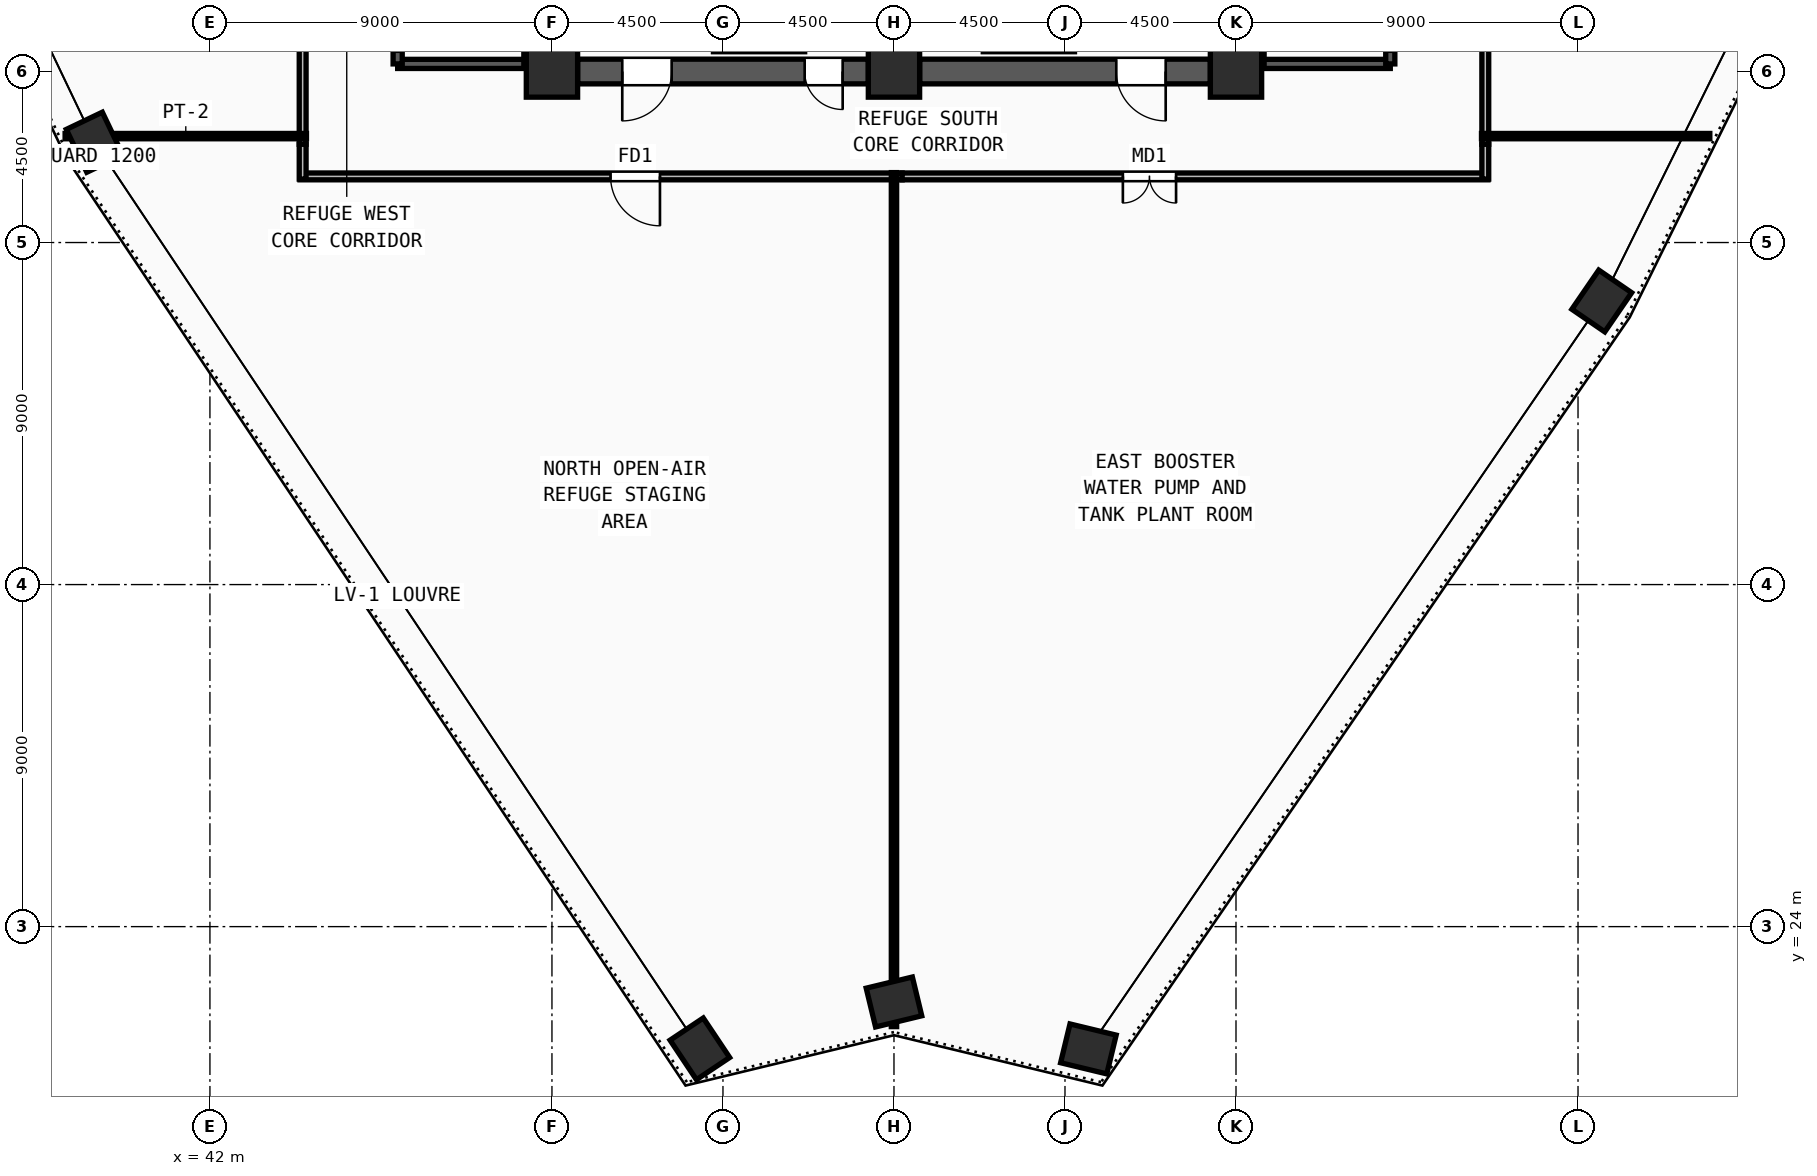
"""IFC4 building model, lengths in metres.
Left out: names, types, materials, properties, quantities, classifications, styles, units other than length and angle.
Written with IfcOpenShell. Run it as: python <this file> out.ifc"""

import sys

from ifc_helpers import new_model, si_unit, direction, frame, frame_2d, origin, origin_2d, place, context, subcontext, project, spatial, rectangle, extrude, source, transform, mapped, element, fill, save


model = new_model("IFC4")
c1 = context("Model", 3, precision=1e-05, world=origin(), true_north=direction((0.0, 1.0)))
c2 = subcontext(c1, "Body", "Model", "MODEL_VIEW")
j1 = project(units=[si_unit("LENGTHUNIT", "METRE"), si_unit("PLANEANGLEUNIT", "RADIAN")], contexts=[c1])
p1 = place(None, origin())
s1 = spatial("IfcSite", under=j1, at=p1, CompositionType="ELEMENT")
p2 = place(p1, origin())
s2 = spatial("IfcBuilding", under=s1, at=p2, CompositionType="ELEMENT")
p3 = place(p2, frame((0.0, 0.0, 277.5)))
s3 = spatial("IfcBuildingStorey", under=s2, at=p3, CompositionType="ELEMENT", Elevation=277.5)
m1 = source(origin(), c2, "Body", "SweptSolid", [
    extrude(rectangle(XDim=1.35, YDim=1.35, at=origin_2d()), origin(), (0.0, 0.0, 1.0), 4.5),
])
for number, where, z_axis, x_axis in (
    (1, (51.0, 46.5, 0.0), (0.0, 0.0, 1.0), (1.0, 0.0, 0.0)),
    (2, (60.0, 46.5, 0.0), (0.0, 0.0, 1.0), (1.0, 0.0, 0.0)),
    (3, (69.0, 46.5, 0.0), (0.0, 0.0, 1.0), (1.0, 0.0, 0.0)),
):
    element("IfcColumn", number, at=place(p3, frame(where, z_axis=z_axis, x_axis=x_axis)), inside=s3, PredefinedType="COLUMN", context=c2, shape_type="MappedRepresentation", body=[
        mapped(m1, transform((0.0, 0.0, 0.0), x_axis=(1.0, 0.0, 0.0), y_axis=(0.0, 1.0, 0.0), z_axis=(0.0, 0.0, 1.0), scale=1.0)),
    ])
m2 = source(origin(), c2, "Body", "SweptSolid", [
    extrude(rectangle(XDim=1.25, YDim=1.05, at=origin_2d()), origin(), (0.0, 0.0, 1.0), 4.5),
])
for number, where, z_axis, x_axis in (
    (4, (54.892, 20.784, 0.0), (0.0, 0.0, 1.0), (-0.555, 0.832, 0.0)),
    (5, (38.964, 44.639, 0.0), (0.0, 0.0, 1.0), (-0.431, 0.902, 0.0)),
    (6, (78.625, 40.462, 0.0), (0.0, 0.0, 1.0), (0.566, 0.824, 0.0)),
    (7, (65.116, 20.782, 0.0), (0.0, 0.0, 1.0), (-0.972, 0.235, 0.0)),
    (8, (60.0, 22.017, 0.0), (0.0, 0.0, 1.0), (0.972, 0.235, 0.0)),
):
    element("IfcColumn", number, at=place(p3, frame(where, z_axis=z_axis, x_axis=x_axis)), inside=s3, PredefinedType="COLUMN", context=c2, shape_type="MappedRepresentation", body=[
        mapped(m2, transform((0.0, 0.0, 0.0), x_axis=(1.0, 0.0, 0.0), y_axis=(0.0, 1.0, 0.0), z_axis=(0.0, 0.0, 1.0), scale=1.0)),
    ])
p4 = place(p3, frame((68.325, 46.5, 0.0), z_axis=(0.0, 0.0, 1.0), x_axis=(-1.0, 0.0, 0.0)))
e9 = element("IfcWall", 9, at=p4, inside=s3, PredefinedType="SHEAR", context=c2, shape_type="SweptSolid", body=[
    extrude(rectangle(XDim=7.65, YDim=0.65, at=frame_2d((3.825, 0.0))), origin(), (0.0, 0.0, 1.0), 4.22),
])
m3 = source(origin(), c2, "Body", "SweptSolid", [
    extrude(rectangle(XDim=1.3, YDim=2.2, at=frame_2d((0.65, 1.1))), frame((0.0, 0.335, 0.0), z_axis=(0.0, -1.0, 0.0), x_axis=(1.0, 0.0, 0.0)), (0.0, 0.0, 1.0), 0.67),
])
p5 = place(p4, frame((1.175, 0.0, 0.0)))
e10 = element("IfcOpeningElement", 10, at=p5, cuts=e9, PredefinedType="OPENING", context=c2, shape_type="MappedRepresentation", body=[
    mapped(m3, transform((0.0, 0.0, 0.0), x_axis=(1.0, 0.0, 0.0), y_axis=(0.0, 1.0, 0.0), z_axis=(0.0, 0.0, 1.0), scale=1.0)),
])
p6 = place(p3, frame((59.325, 46.5, 0.0), z_axis=(0.0, 0.0, 1.0), x_axis=(-1.0, 0.0, 0.0)))
e11 = element("IfcWall", 11, at=p6, inside=s3, PredefinedType="SHEAR", context=c2, shape_type="SweptSolid", body=[
    extrude(rectangle(XDim=7.65, YDim=0.65, at=frame_2d((3.825, 0.0))), origin(), (0.0, 0.0, 1.0), 4.22),
])
p7 = place(p6, frame((5.175, 0.0, 0.0)))
e12 = element("IfcOpeningElement", 12, at=p7, cuts=e11, PredefinedType="OPENING", context=c2, shape_type="MappedRepresentation", body=[
    mapped(m3, transform((0.0, 0.0, 0.0), x_axis=(1.0, 0.0, 0.0), y_axis=(0.0, 1.0, 0.0), z_axis=(0.0, 0.0, 1.0), scale=1.0)),
])
m4 = source(origin(), c2, "Body", "SweptSolid", [
    extrude(rectangle(XDim=1.0, YDim=2.2, at=frame_2d((0.5, 1.1))), frame((0.0, 0.335, 0.0), z_axis=(0.0, -1.0, 0.0), x_axis=(1.0, 0.0, 0.0)), (0.0, 0.0, 1.0), 0.67),
])
p8 = place(p6, frame((0.675, 0.0, 0.0)))
e13 = element("IfcOpeningElement", 13, at=p8, cuts=e11, PredefinedType="OPENING", context=c2, shape_type="MappedRepresentation", body=[
    mapped(m4, transform((0.0, 0.0, 0.0), x_axis=(1.0, 0.0, 0.0), y_axis=(0.0, 1.0, 0.0), z_axis=(0.0, 0.0, 1.0), scale=1.0)),
])
p9 = place(p3, frame((46.94, 46.7, 0.0), z_axis=(0.0, 0.0, 1.0), x_axis=(1.0, 0.0, 0.0)))
e14 = element("IfcWall", 14, at=p9, inside=s3, PredefinedType="SOLIDWALL", context=c2, shape_type="SweptSolid", body=[
    extrude(rectangle(XDim=3.44, YDim=0.24, at=frame_2d((1.72, 0.0))), origin(), (0.0, 0.0, 1.0), 4.22),
])
p10 = place(p3, frame((50.38, 46.7, 0.0), z_axis=(0.0, 0.0, 1.0), x_axis=(0.0, 1.0, 0.0)))
e15 = element("IfcWall", 15, at=p10, inside=s3, PredefinedType="SOLIDWALL", context=c2, shape_type="SweptSolid", body=[
    extrude(rectangle(XDim=7.82, YDim=0.24, at=frame_2d((3.91, 0.0))), origin(), (0.0, 0.0, 1.0), 4.22),
])
p11 = place(p3, frame((46.94, 54.52, 0.0), z_axis=(0.0, 0.0, 1.0), x_axis=(0.0, -1.0, 0.0)))
e16 = element("IfcWall", 16, at=p11, inside=s3, PredefinedType="SOLIDWALL", context=c2, shape_type="SweptSolid", body=[
    extrude(rectangle(XDim=7.82, YDim=0.24, at=frame_2d((3.91, 0.0))), origin(), (0.0, 0.0, 1.0), 4.22),
])
m5 = source(origin(), c2, "Body", "SweptSolid", [
    extrude(rectangle(XDim=1.2, YDim=2.2, at=frame_2d((0.6, 1.1))), frame((0.0, 0.13, 0.0), z_axis=(0.0, -1.0, 0.0), x_axis=(1.0, 0.0, 0.0)), (0.0, 0.0, 1.0), 0.26),
])
p12 = place(p11, frame((6.3, 0.0, 0.0)))
e17 = element("IfcOpeningElement", 17, at=p12, cuts=e16, PredefinedType="OPENING", context=c2, shape_type="MappedRepresentation", body=[
    mapped(m5, transform((0.0, 0.0, 0.0), x_axis=(1.0, 0.0, 0.0), y_axis=(0.0, 1.0, 0.0), z_axis=(0.0, 0.0, 1.0), scale=1.0)),
])
p13 = place(p3, frame((69.62, 46.7, 0.0), z_axis=(0.0, 0.0, 1.0), x_axis=(1.0, 0.0, 0.0)))
e18 = element("IfcWall", 18, at=p13, inside=s3, PredefinedType="SOLIDWALL", context=c2, shape_type="SweptSolid", body=[
    extrude(rectangle(XDim=3.44, YDim=0.24, at=frame_2d((1.72, 0.0))), origin(), (0.0, 0.0, 1.0), 4.22),
])
p14 = place(p3, frame((73.06, 46.7, 0.0), z_axis=(0.0, 0.0, 1.0), x_axis=(0.0, 1.0, 0.0)))
e19 = element("IfcWall", 19, at=p14, inside=s3, PredefinedType="SOLIDWALL", context=c2, shape_type="SweptSolid", body=[
    extrude(rectangle(XDim=7.82, YDim=0.24, at=frame_2d((3.91, 0.0))), origin(), (0.0, 0.0, 1.0), 4.22),
])
p15 = place(p14, frame((0.32, 0.0, 0.0)))
e20 = element("IfcOpeningElement", 20, at=p15, cuts=e19, PredefinedType="OPENING", context=c2, shape_type="MappedRepresentation", body=[
    mapped(m5, transform((0.0, 0.0, 0.0), x_axis=(1.0, 0.0, 0.0), y_axis=(0.0, 1.0, 0.0), z_axis=(0.0, 0.0, 1.0), scale=1.0)),
])
p16 = place(p3, frame((69.62, 54.52, 0.0), z_axis=(0.0, 0.0, 1.0), x_axis=(0.0, -1.0, 0.0)))
e21 = element("IfcWall", 21, at=p16, inside=s3, PredefinedType="SOLIDWALL", context=c2, shape_type="SweptSolid", body=[
    extrude(rectangle(XDim=7.82, YDim=0.24, at=frame_2d((3.91, 0.0))), origin(), (0.0, 0.0, 1.0), 4.22),
])
p17 = place(p3, frame((75.56, 67.015, 0.0), z_axis=(0.0, 0.0, 1.0), x_axis=(0.0, -1.0, 0.0)))
e22 = element("IfcWall", 22, at=p17, inside=s3, PredefinedType="PARTITIONING", context=c2, shape_type="SweptSolid", body=[
    extrude(rectangle(XDim=22.43, YDim=0.18, at=frame_2d((11.215, 0.0))), origin(), (0.0, 0.0, 1.0), 4.22),
])
m6 = source(origin(), c2, "Body", "SweptSolid", [
    extrude(rectangle(XDim=1.3, YDim=2.2, at=frame_2d((0.65, 1.1))), frame((0.0, 0.1, 0.0), z_axis=(0.0, -1.0, 0.0), x_axis=(1.0, 0.0, 0.0)), (0.0, 0.0, 1.0), 0.2),
])
p18 = place(p17, frame((10.565, 0.0, 0.0)))
e23 = element("IfcOpeningElement", 23, at=p18, cuts=e22, PredefinedType="OPENING", context=c2, shape_type="MappedRepresentation", body=[
    mapped(m6, transform((0.0, 0.0, 0.0), x_axis=(1.0, 0.0, 0.0), y_axis=(0.0, 1.0, 0.0), z_axis=(0.0, 0.0, 1.0), scale=1.0)),
])
p19 = place(p3, frame((60.215, 43.74, 0.0), z_axis=(0.0, 0.0, 1.0), x_axis=(-1.0, 0.0, 0.0)))
e24 = element("IfcWall", 24, at=p19, inside=s3, PredefinedType="PARTITIONING", context=c2, shape_type="SweptSolid", body=[
    extrude(rectangle(XDim=15.845, YDim=0.18, at=frame_2d((7.922, 0.0))), origin(), (0.0, 0.0, 1.0), 4.22),
])
p20 = place(p19, frame((6.373, 0.0, 0.0)))
e25 = element("IfcOpeningElement", 25, at=p20, cuts=e24, PredefinedType="OPENING", context=c2, shape_type="MappedRepresentation", body=[
    mapped(m6, transform((0.0, 0.0, 0.0), x_axis=(1.0, 0.0, 0.0), y_axis=(0.0, 1.0, 0.0), z_axis=(0.0, 0.0, 1.0), scale=1.0)),
])
p21 = place(p3, frame((75.63, 43.74, 0.0), z_axis=(0.0, 0.0, 1.0), x_axis=(-1.0, 0.0, 0.0)))
e26 = element("IfcWall", 26, at=p21, inside=s3, PredefinedType="PARTITIONING", context=c2, shape_type="SweptSolid", body=[
    extrude(rectangle(XDim=15.415, YDim=0.18, at=frame_2d((7.708, 0.0))), origin(), (0.0, 0.0, 1.0), 4.22),
])
m7 = source(origin(), c2, "Body", "SweptSolid", [
    extrude(rectangle(XDim=1.4, YDim=2.25, at=frame_2d((0.7, 1.125))), frame((0.0, 0.1, 0.0), z_axis=(0.0, -1.0, 0.0), x_axis=(1.0, 0.0, 0.0)), (0.0, 0.0, 1.0), 0.2),
])
p22 = place(p21, frame((8.207, 0.0, 0.0)))
e27 = element("IfcOpeningElement", 27, at=p22, cuts=e26, PredefinedType="OPENING", context=c2, shape_type="MappedRepresentation", body=[
    mapped(m7, transform((0.0, 0.0, 0.0), x_axis=(1.0, 0.0, 0.0), y_axis=(0.0, 1.0, 0.0), z_axis=(0.0, 0.0, 1.0), scale=1.0)),
])
p23 = place(p3, frame((44.44, 44.585, 0.0), z_axis=(0.0, 0.0, 1.0), x_axis=(0.0, 1.0, 0.0)))
e28 = element("IfcWall", 28, at=p23, inside=s3, PredefinedType="PARTITIONING", context=c2, shape_type="SweptSolid", body=[
    extrude(rectangle(XDim=2.755, YDim=0.18, at=frame_2d((1.377, 0.0))), origin(), (0.0, 0.0, 1.0), 4.22),
])
for number, where, z_axis, x_axis in (
    (29, (44.44, 43.67, 0.0), (0.0, 0.0, 1.0), (0.0, 1.0, 0.0)),
    (30, (75.56, 44.585, 0.0), (0.0, 0.0, 1.0), (0.0, -1.0, 0.0)),
):
    element("IfcWall", number, at=place(p3, frame(where, z_axis=z_axis, x_axis=x_axis)), inside=s3, PredefinedType="PARTITIONING", context=c2, shape_type="SweptSolid", body=[
        extrude(rectangle(XDim=0.915, YDim=0.18, at=frame_2d((0.458, 0.0))), origin(), (0.0, 0.0, 1.0), 4.22),
    ])
p24 = place(p3, frame((44.54, 44.8, 0.0), z_axis=(0.0, 0.0, 1.0), x_axis=(-1.0, 0.0, 0.0)))
e31 = element("IfcWall", 31, at=p24, inside=s3, PredefinedType="PARTITIONING", context=c2, shape_type="SweptSolid", body=[
    extrude(rectangle(XDim=6.351, YDim=0.14, at=frame_2d((3.176, 0.0))), origin(), (0.0, 0.0, 1.0), 4.22),
])
p25 = place(p3, frame((75.46, 44.8, 0.0), z_axis=(0.0, 0.0, 1.0), x_axis=(1.0, 0.0, 0.0)))
e32 = element("IfcWall", 32, at=p25, inside=s3, PredefinedType="PARTITIONING", context=c2, shape_type="SweptSolid", body=[
    extrude(rectangle(XDim=6.008, YDim=0.14, at=frame_2d((3.004, 0.0))), origin(), (0.0, 0.0, 1.0), 4.22),
])
p26 = place(p3, frame((60.0, 43.84, 0.0), z_axis=(0.0, 0.0, 1.0), x_axis=(0.0, -1.0, 0.0)))
e33 = element("IfcWall", 33, at=p26, inside=s3, PredefinedType="PARTITIONING", context=c2, shape_type="SweptSolid", body=[
    extrude(rectangle(XDim=22.471, YDim=0.14, at=frame_2d((11.236, 0.0))), origin(), (0.0, 0.0, 1.0), 4.22),
])
m8 = source(origin(), c2, "Body", "SweptSolid", [
    extrude(rectangle(XDim=1.3, YDim=2.2, at=frame_2d((0.65, 1.1))), frame((0.0, 0.025, 0.0), z_axis=(0.0, -1.0, 0.0), x_axis=(1.0, 0.0, 0.0)), (0.0, 0.0, 1.0), 0.05),
])
p27 = place(p7, origin())
e34 = element("IfcDoor", 34, at=p27, inside=s3, OperationType="SINGLE_SWING_RIGHT", PredefinedType="DOOR", context=c2, shape_type="MappedRepresentation", body=[
    mapped(m8, transform((0.0, 0.0, 0.0), x_axis=(1.0, 0.0, 0.0), y_axis=(0.0, 1.0, 0.0), z_axis=(0.0, 0.0, 1.0), scale=1.0)),
])
fill(e12, e34)
m9 = source(origin(), c2, "Body", "SweptSolid", [
    extrude(rectangle(XDim=1.0, YDim=2.2, at=frame_2d((0.5, 1.1))), frame((0.0, 0.025, 0.0), z_axis=(0.0, -1.0, 0.0), x_axis=(1.0, 0.0, 0.0)), (0.0, 0.0, 1.0), 0.05),
])
p28 = place(p8, origin())
e35 = element("IfcDoor", 35, at=p28, inside=s3, OperationType="SINGLE_SWING_LEFT", PredefinedType="DOOR", context=c2, shape_type="MappedRepresentation", body=[
    mapped(m9, transform((0.0, 0.0, 0.0), x_axis=(1.0, 0.0, 0.0), y_axis=(0.0, 1.0, 0.0), z_axis=(0.0, 0.0, 1.0), scale=1.0)),
])
fill(e13, e35)
p29 = place(p5, origin())
e36 = element("IfcDoor", 36, at=p29, inside=s3, OperationType="SINGLE_SWING_LEFT", PredefinedType="DOOR", context=c2, shape_type="MappedRepresentation", body=[
    mapped(m8, transform((0.0, 0.0, 0.0), x_axis=(1.0, 0.0, 0.0), y_axis=(0.0, 1.0, 0.0), z_axis=(0.0, 0.0, 1.0), scale=1.0)),
])
fill(e10, e36)
p30 = place(p20, origin())
e37 = element("IfcDoor", 37, at=p30, inside=s3, OperationType="SINGLE_SWING_LEFT", PredefinedType="DOOR", context=c2, shape_type="MappedRepresentation", body=[
    mapped(m8, transform((0.0, 0.0, 0.0), x_axis=(1.0, 0.0, 0.0), y_axis=(0.0, 1.0, 0.0), z_axis=(0.0, 0.0, 1.0), scale=1.0)),
])
fill(e25, e37)
m10 = source(origin(), c2, "Body", "SweptSolid", [
    extrude(rectangle(XDim=1.4, YDim=2.25, at=frame_2d((0.7, 1.125))), frame((0.0, 0.025, 0.0), z_axis=(0.0, -1.0, 0.0), x_axis=(1.0, 0.0, 0.0)), (0.0, 0.0, 1.0), 0.05),
])
p31 = place(p22, origin())
e38 = element("IfcDoor", 38, at=p31, inside=s3, OperationType="DOUBLE_DOOR_SINGLE_SWING", PredefinedType="DOOR", context=c2, shape_type="MappedRepresentation", body=[
    mapped(m10, transform((0.0, 0.0, 0.0), x_axis=(1.0, 0.0, 0.0), y_axis=(0.0, 1.0, 0.0), z_axis=(0.0, 0.0, 1.0), scale=1.0)),
])
fill(e27, e38)
save(model, sys.argv[1])
